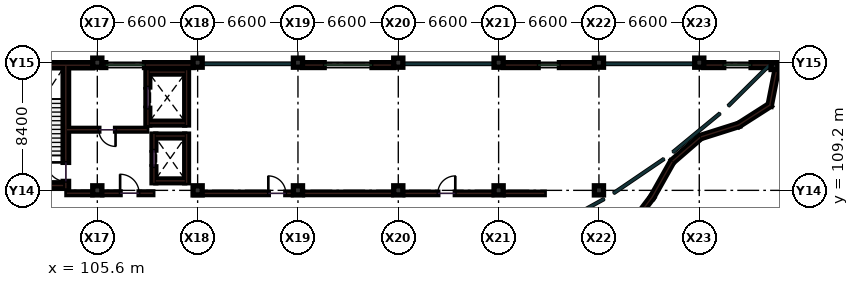
"""IFC4 building model, lengths in metres.
Left out: names, types, materials, properties, quantities, classifications, styles, units other than length and angle.
Written with IfcOpenShell. Run it as: python <this file> out.ifc"""

import sys

from ifc_helpers import new_model, si_unit, direction, frame, frame_2d, origin, origin_2d, place, context, subcontext, project, spatial, rectangle, extrude, element, fill, save


model = new_model("IFC4")
c1 = context("Model", 3, precision=1e-05, world=origin(), true_north=direction((0.0, 1.0)))
c2 = subcontext(c1, "Body", "Model", "MODEL_VIEW")
j1 = project(units=[si_unit("LENGTHUNIT", "METRE"), si_unit("PLANEANGLEUNIT", "RADIAN")], contexts=[c1])
p1 = place(None, origin())
s1 = spatial("IfcSite", under=j1, at=p1, CompositionType="ELEMENT")
p2 = place(p1, origin())
s2 = spatial("IfcBuilding", under=s1, at=p2, CompositionType="ELEMENT")
p3 = place(p2, frame((0.0, 0.0, 9.9)))
s3 = spatial("IfcBuildingStorey", under=s2, at=p3, CompositionType="ELEMENT", Elevation=9.9)
for number, where, z_axis, x_axis in (
    (1, (105.6, 109.2, 0.0), (0.0, 0.0, 1.0), (1.0, 0.0, 0.0)),
    (2, (105.6, 117.6, 0.0), (0.0, 0.0, 1.0), (1.0, 0.0, 0.0)),
    (3, (112.2, 109.2, 0.0), (0.0, 0.0, 1.0), (1.0, 0.0, 0.0)),
    (4, (112.2, 117.6, 0.0), (0.0, 0.0, 1.0), (1.0, 0.0, 0.0)),
    (5, (118.8, 109.2, 0.0), (0.0, 0.0, 1.0), (1.0, 0.0, 0.0)),
    (6, (118.8, 117.6, 0.0), (0.0, 0.0, 1.0), (1.0, 0.0, 0.0)),
    (7, (125.4, 109.2, 0.0), (0.0, 0.0, 1.0), (1.0, 0.0, 0.0)),
    (8, (125.4, 117.6, 0.0), (0.0, 0.0, 1.0), (1.0, 0.0, 0.0)),
    (9, (132.0, 109.2, 0.0), (0.0, 0.0, 1.0), (1.0, 0.0, 0.0)),
    (10, (132.0, 117.6, 0.0), (0.0, 0.0, 1.0), (1.0, 0.0, 0.0)),
    (11, (138.6, 109.2, 0.0), (0.0, 0.0, 1.0), (1.0, 0.0, 0.0)),
    (12, (138.6, 117.6, 0.0), (0.0, 0.0, 1.0), (1.0, 0.0, 0.0)),
    (13, (145.2, 117.6, 0.0), (0.0, 0.0, 1.0), (1.0, 0.0, 0.0)),
):
    element("IfcColumn", number, at=place(p3, frame(where, z_axis=z_axis, x_axis=x_axis)), inside=s3, PredefinedType="COLUMN", context=c2, shape_type="SweptSolid", body=[
        extrude(rectangle(XDim=0.6, YDim=0.6, at=origin_2d()), origin(), (0.0, 0.0, 1.0), 4.5),
    ])
p4 = place(p3, frame((150.15, 117.375, 0.0), z_axis=(0.0, 0.0, 1.0), x_axis=(1.0, 0.0, 0.0)))
e14 = element("IfcColumn", 14, at=p4, inside=s3, PredefinedType="COLUMN", context=c2, shape_type="SweptSolid", body=[
    extrude(rectangle(XDim=0.45, YDim=0.45, at=origin_2d()), origin(), (0.0, 0.0, 1.0), 4.5),
])
p5 = place(p3, frame((112.0, 109.0, 0.0), z_axis=(0.0, 0.0, 1.0), x_axis=(1.0, 0.0, 0.0)))
e15 = element("IfcWall", 15, at=p5, inside=s3, PredefinedType="PARTITIONING", context=c2, shape_type="SweptSolid", body=[
    extrude(rectangle(XDim=6.35, YDim=0.16, at=frame_2d((3.175, 0.0))), origin(), (0.0, 0.0, 1.0), 3.475),
])
p6 = place(p5, frame((4.85, 0.0, 0.0)))
e16 = element("IfcOpeningElement", 16, at=p6, cuts=e15, PredefinedType="OPENING", context=c2, shape_type="SweptSolid", body=[
    extrude(rectangle(XDim=1.15, YDim=2.2, at=frame_2d((0.575, 1.1))), frame((0.0, 0.09, 0.0), z_axis=(0.0, -1.0, 0.0), x_axis=(1.0, 0.0, 0.0)), (0.0, 0.0, 1.0), 0.18),
])
p7 = place(p3, frame((119.25, 109.0, 0.0), z_axis=(0.0, 0.0, 1.0), x_axis=(1.0, 0.0, 0.0)))
e17 = element("IfcWall", 17, at=p7, inside=s3, PredefinedType="PARTITIONING", context=c2, shape_type="SweptSolid", body=[
    extrude(rectangle(XDim=5.7, YDim=0.16, at=frame_2d((2.85, 0.0))), origin(), (0.0, 0.0, 1.0), 3.475),
])
p8 = place(p3, frame((125.85, 109.0, 0.0), z_axis=(0.0, 0.0, 1.0), x_axis=(1.0, 0.0, 0.0)))
e18 = element("IfcWall", 18, at=p8, inside=s3, PredefinedType="PARTITIONING", context=c2, shape_type="SweptSolid", body=[
    extrude(rectangle(XDim=5.7, YDim=0.16, at=frame_2d((2.85, 0.0))), origin(), (0.0, 0.0, 1.0), 3.475),
])
p9 = place(p8, frame((2.15, 0.0, 0.0)))
e19 = element("IfcOpeningElement", 19, at=p9, cuts=e18, PredefinedType="OPENING", context=c2, shape_type="SweptSolid", body=[
    extrude(rectangle(XDim=1.15, YDim=2.2, at=frame_2d((0.575, 1.1))), frame((0.0, 0.09, 0.0), z_axis=(0.0, -1.0, 0.0), x_axis=(1.0, 0.0, 0.0)), (0.0, 0.0, 1.0), 0.18),
])
p10 = place(p3, frame((132.45, 109.0, 0.0), z_axis=(0.0, 0.0, 1.0), x_axis=(1.0, 0.0, 0.0)))
e20 = element("IfcWall", 20, at=p10, inside=s3, PredefinedType="PARTITIONING", context=c2, shape_type="SweptSolid", body=[
    extrude(rectangle(XDim=2.55, YDim=0.16, at=frame_2d((1.275, 0.0))), origin(), (0.0, 0.0, 1.0), 3.475),
])
p11 = place(p3, frame((105.305, 117.43, 0.0), z_axis=(0.0, 0.0, 1.0), x_axis=(-1.0, 0.0, 0.0)))
e21 = element("IfcWall", 21, at=p11, inside=s3, PredefinedType="SHEAR", context=c2, shape_type="SweptSolid", body=[
    extrude(rectangle(XDim=6.01, YDim=0.34, at=frame_2d((3.005, 0.0))), origin(), (0.0, 0.0, 1.0), 4.24),
])
p12 = place(p3, frame((111.905, 117.44, 0.0), z_axis=(0.0, 0.0, 1.0), x_axis=(-1.0, 0.0, 0.0)))
e22 = element("IfcWall", 22, at=p12, inside=s3, PredefinedType="SOLIDWALL", context=c2, shape_type="SweptSolid", body=[
    extrude(rectangle(XDim=6.01, YDim=0.32, at=frame_2d((3.005, 0.0))), origin(), (0.0, 0.0, 1.0), 3.625),
])
p13 = place(p12, frame((3.2, 0.0, 0.95)))
e23 = element("IfcOpeningElement", 23, at=p13, cuts=e22, PredefinedType="OPENING", context=c2, shape_type="SweptSolid", body=[
    extrude(rectangle(XDim=2.55, YDim=1.65, at=frame_2d((1.275, 0.825))), frame((0.0, 0.17, 0.0), z_axis=(0.0, -1.0, 0.0), x_axis=(1.0, 0.0, 0.0)), (0.0, 0.0, 1.0), 0.34),
])
p14 = place(p3, frame((125.105, 117.44, 0.0), z_axis=(0.0, 0.0, 1.0), x_axis=(-1.0, 0.0, 0.0)))
e24 = element("IfcWall", 24, at=p14, inside=s3, PredefinedType="SOLIDWALL", context=c2, shape_type="SweptSolid", body=[
    extrude(rectangle(XDim=6.01, YDim=0.32, at=frame_2d((3.005, 0.0))), origin(), (0.0, 0.0, 1.0), 3.625),
])
p15 = place(p14, frame((1.43, 0.0, 0.95)))
e25 = element("IfcOpeningElement", 25, at=p15, cuts=e24, PredefinedType="OPENING", context=c2, shape_type="SweptSolid", body=[
    extrude(rectangle(XDim=3.15, YDim=1.7, at=frame_2d((1.575, 0.85))), frame((0.0, 0.17, 0.0), z_axis=(0.0, -1.0, 0.0), x_axis=(1.0, 0.0, 0.0)), (0.0, 0.0, 1.0), 0.34),
])
p16 = place(p3, frame((138.305, 117.44, 0.0), z_axis=(0.0, 0.0, 1.0), x_axis=(-1.0, 0.0, 0.0)))
e26 = element("IfcWall", 26, at=p16, inside=s3, PredefinedType="SOLIDWALL", context=c2, shape_type="SweptSolid", body=[
    extrude(rectangle(XDim=6.01, YDim=0.32, at=frame_2d((3.005, 0.0))), origin(), (0.0, 0.0, 1.0), 3.625),
])
p17 = place(p16, frame((2.305, 0.0, 0.95)))
e27 = element("IfcOpeningElement", 27, at=p17, cuts=e26, PredefinedType="OPENING", context=c2, shape_type="SweptSolid", body=[
    extrude(rectangle(XDim=1.4, YDim=1.95, at=frame_2d((0.7, 0.975))), frame((0.0, 0.17, 0.0), z_axis=(0.0, -1.0, 0.0), x_axis=(1.0, 0.0, 0.0)), (0.0, 0.0, 1.0), 0.34),
])
p18 = place(p3, frame((140.52, 106.67, 0.0), z_axis=(0.0, 0.0, 1.0), x_axis=(0.604579472853, 0.796544826739, 0.0)))
e28 = element("IfcWall", 28, at=p18, inside=s3, PredefinedType="SOLIDWALL", context=c2, shape_type="SweptSolid", body=[
    extrude(rectangle(XDim=2.63, YDim=0.22, at=frame_2d((1.315, 0.0))), origin(), (0.0, 0.0, 1.0), 1.45),
])
p19 = place(p3, frame((142.1, 108.75, 0.0), z_axis=(0.0, 0.0, 1.0), x_axis=(0.491473824436, 0.870892346903, 0.0)))
e29 = element("IfcWall", 29, at=p19, inside=s3, PredefinedType="SOLIDWALL", context=c2, shape_type="SweptSolid", body=[
    extrude(rectangle(XDim=2.676, YDim=0.22, at=frame_2d((1.338, 0.0))), origin(), (0.0, 0.0, 1.0), 1.45),
])
p20 = place(p3, frame((143.445, 111.115, 0.0), z_axis=(0.0, 0.0, 1.0), x_axis=(0.756282902718, 0.654244733304, 0.0)))
e30 = element("IfcWall", 30, at=p20, inside=s3, PredefinedType="SOLIDWALL", context=c2, shape_type="SweptSolid", body=[
    extrude(rectangle(XDim=2.4, YDim=0.22, at=frame_2d((1.2, 0.0))), origin(), (0.0, 0.0, 1.0), 1.45),
])
p21 = place(p3, frame((145.31, 112.715, 0.0), z_axis=(0.0, 0.0, 1.0), x_axis=(0.953332884241, 0.301921201351, 0.0)))
e31 = element("IfcWall", 31, at=p21, inside=s3, PredefinedType="SOLIDWALL", context=c2, shape_type="SweptSolid", body=[
    extrude(rectangle(XDim=2.633, YDim=0.22, at=frame_2d((1.316, 0.0))), origin(), (0.0, 0.0, 1.0), 1.45),
])
p22 = place(p3, frame((147.785, 113.495, 0.0), z_axis=(0.0, 0.0, 1.0), x_axis=(0.842674087903, 0.538423979385, 0.0)))
e32 = element("IfcWall", 32, at=p22, inside=s3, PredefinedType="SOLIDWALL", context=c2, shape_type="SweptSolid", body=[
    extrude(rectangle(XDim=2.498, YDim=0.22, at=frame_2d((1.249, 0.0))), origin(), (0.0, 0.0, 1.0), 1.45),
])
p23 = place(p3, frame((149.825, 114.745, 0.0), z_axis=(0.0, 0.0, 1.0), x_axis=(0.192134851616, 0.981368533628, 0.0)))
e33 = element("IfcWall", 33, at=p23, inside=s3, PredefinedType="SOLIDWALL", context=c2, shape_type="SweptSolid", body=[
    extrude(rectangle(XDim=2.655, YDim=0.22, at=frame_2d((1.327, 0.0))), origin(), (0.0, 0.0, 1.0), 1.45),
])
p24 = place(p3, frame((149.93, 117.44, 0.0), z_axis=(0.0, 0.0, 1.0), x_axis=(-1.0, 0.0, 0.0)))
e34 = element("IfcWall", 34, at=p24, inside=s3, PredefinedType="SOLIDWALL", context=c2, shape_type="SweptSolid", body=[
    extrude(rectangle(XDim=4.435, YDim=0.32, at=frame_2d((2.217, 0.0))), origin(), (0.0, 0.0, 1.0), 3.625),
])
p25 = place(p24, frame((1.32, 0.0, 0.95)))
e35 = element("IfcOpeningElement", 35, at=p25, cuts=e34, PredefinedType="OPENING", context=c2, shape_type="SweptSolid", body=[
    extrude(rectangle(XDim=1.8, YDim=1.6, at=frame_2d((0.9, 0.8))), frame((0.0, 0.17, 0.0), z_axis=(0.0, -1.0, 0.0), x_axis=(1.0, 0.0, 0.0)), (0.0, 0.0, 1.0), 0.34),
])
p26 = place(p3, frame((103.53, 109.34, 0.0), z_axis=(0.0, 0.0, 1.0), x_axis=(0.0, 1.0, 0.0)))
e36 = element("IfcWall", 36, at=p26, inside=s3, PredefinedType="SHEAR", context=c2, shape_type="SweptSolid", body=[
    extrude(rectangle(XDim=8.09, YDim=0.36, at=frame_2d((4.045, 0.0))), origin(), (0.0, 0.0, 1.0), 4.24),
])
p27 = place(p26, frame((0.45, 0.0, 0.0)))
e37 = element("IfcOpeningElement", 37, at=p27, cuts=e36, PredefinedType="OPENING", context=c2, shape_type="SweptSolid", body=[
    extrude(rectangle(XDim=1.25, YDim=2.15, at=frame_2d((0.625, 1.075))), frame((0.0, 0.19, 0.0), z_axis=(0.0, -1.0, 0.0), x_axis=(1.0, 0.0, 0.0)), (0.0, 0.0, 1.0), 0.38),
])
p28 = place(p3, frame((99.55, 109.52, 0.0), z_axis=(0.0, 0.0, 1.0), x_axis=(1.0, 0.0, 0.0)))
e38 = element("IfcWall", 38, at=p28, inside=s3, PredefinedType="SHEAR", context=c2, shape_type="SweptSolid", body=[
    extrude(rectangle(XDim=3.8, YDim=0.36, at=frame_2d((1.9, 0.0))), origin(), (0.0, 0.0, 1.0), 4.24),
])
p29 = place(p3, frame((109.325, 109.7, 0.0), z_axis=(0.0, 0.0, 1.0), x_axis=(0.0, 1.0, 0.0)))
e39 = element("IfcWall", 39, at=p29, inside=s3, PredefinedType="SHEAR", context=c2, shape_type="SweptSolid", body=[
    extrude(rectangle(XDim=3.2, YDim=0.25, at=frame_2d((1.6, 0.0))), origin(), (0.0, 0.0, 1.0), 4.24),
])
p30 = place(p29, frame((1.05, 0.0, 0.0)))
e40 = element("IfcOpeningElement", 40, at=p30, cuts=e39, PredefinedType="OPENING", context=c2, shape_type="SweptSolid", body=[
    extrude(rectangle(XDim=1.1, YDim=2.15, at=frame_2d((0.55, 1.075))), frame((0.0, 0.135, 0.0), z_axis=(0.0, -1.0, 0.0), x_axis=(1.0, 0.0, 0.0)), (0.0, 0.0, 1.0), 0.27),
])
p31 = place(p3, frame((111.475, 109.7, 0.0), z_axis=(0.0, 0.0, 1.0), x_axis=(0.0, 1.0, 0.0)))
e41 = element("IfcWall", 41, at=p31, inside=s3, PredefinedType="SHEAR", context=c2, shape_type="SweptSolid", body=[
    extrude(rectangle(XDim=3.2, YDim=0.25, at=frame_2d((1.6, 0.0))), origin(), (0.0, 0.0, 1.0), 4.24),
])
for number, where, z_axis, x_axis in (
    (42, (109.45, 109.825, 0.0), (0.0, 0.0, 1.0), (1.0, 0.0, 0.0)),
    (43, (109.45, 112.775, 0.0), (0.0, 0.0, 1.0), (1.0, 0.0, 0.0)),
):
    element("IfcWall", number, at=place(p3, frame(where, z_axis=z_axis, x_axis=x_axis)), inside=s3, PredefinedType="SHEAR", context=c2, shape_type="SweptSolid", body=[
        extrude(rectangle(XDim=1.9, YDim=0.25, at=frame_2d((0.95, 0.0))), origin(), (0.0, 0.0, 1.0), 4.24),
    ])
p32 = place(p3, frame((108.925, 113.5, 0.0), z_axis=(0.0, 0.0, 1.0), x_axis=(0.0, 1.0, 0.0)))
e44 = element("IfcWall", 44, at=p32, inside=s3, PredefinedType="SHEAR", context=c2, shape_type="SweptSolid", body=[
    extrude(rectangle(XDim=3.6, YDim=0.25, at=frame_2d((1.8, 0.0))), origin(), (0.0, 0.0, 1.0), 4.24),
])
p33 = place(p32, frame((1.1, 0.0, 0.0)))
e45 = element("IfcOpeningElement", 45, at=p33, cuts=e44, PredefinedType="OPENING", context=c2, shape_type="SweptSolid", body=[
    extrude(rectangle(XDim=1.4, YDim=2.2, at=frame_2d((0.7, 1.1))), frame((0.0, 0.135, 0.0), z_axis=(0.0, -1.0, 0.0), x_axis=(1.0, 0.0, 0.0)), (0.0, 0.0, 1.0), 0.27),
])
p34 = place(p3, frame((111.475, 113.5, 0.0), z_axis=(0.0, 0.0, 1.0), x_axis=(0.0, 1.0, 0.0)))
e46 = element("IfcWall", 46, at=p34, inside=s3, PredefinedType="SHEAR", context=c2, shape_type="SweptSolid", body=[
    extrude(rectangle(XDim=3.6, YDim=0.25, at=frame_2d((1.8, 0.0))), origin(), (0.0, 0.0, 1.0), 4.24),
])
for number, where, z_axis, x_axis in (
    (47, (109.05, 113.625, 0.0), (0.0, 0.0, 1.0), (1.0, 0.0, 0.0)),
    (48, (109.05, 116.975, 0.0), (0.0, 0.0, 1.0), (1.0, 0.0, 0.0)),
):
    element("IfcWall", number, at=place(p3, frame(where, z_axis=z_axis, x_axis=x_axis)), inside=s3, PredefinedType="SHEAR", context=c2, shape_type="SweptSolid", body=[
        extrude(rectangle(XDim=2.3, YDim=0.25, at=frame_2d((1.15, 0.0))), origin(), (0.0, 0.0, 1.0), 4.24),
    ])
p35 = place(p3, frame((103.6, 109.01, 0.0), z_axis=(0.0, 0.0, 1.0), x_axis=(1.0, 0.0, 0.0)))
e49 = element("IfcWall", 49, at=p35, inside=s3, PredefinedType="SOLIDWALL", context=c2, shape_type="SweptSolid", body=[
    extrude(rectangle(XDim=1.65, YDim=0.18, at=frame_2d((0.825, 0.0))), origin(), (0.0, 0.0, 1.0), 3.475),
])
p36 = place(p3, frame((105.95, 109.01, 0.0), z_axis=(0.0, 0.0, 1.0), x_axis=(1.0, 0.0, 0.0)))
e50 = element("IfcWall", 50, at=p36, inside=s3, PredefinedType="SOLIDWALL", context=c2, shape_type="SweptSolid", body=[
    extrude(rectangle(XDim=3.3, YDim=0.18, at=frame_2d((1.65, 0.0))), origin(), (0.0, 0.0, 1.0), 3.475),
])
p37 = place(p36, frame((1.15, 0.0, 0.0)))
e51 = element("IfcOpeningElement", 51, at=p37, cuts=e50, PredefinedType="OPENING", context=c2, shape_type="SweptSolid", body=[
    extrude(rectangle(XDim=1.25, YDim=2.15, at=frame_2d((0.625, 1.075))), frame((0.0, 0.1, 0.0), z_axis=(0.0, -1.0, 0.0), x_axis=(1.0, 0.0, 0.0)), (0.0, 0.0, 1.0), 0.2),
])
p38 = place(p3, frame((103.6, 113.19, 0.0), z_axis=(0.0, 0.0, 1.0), x_axis=(1.0, 0.0, 0.0)))
e52 = element("IfcWall", 52, at=p38, inside=s3, PredefinedType="SOLIDWALL", context=c2, shape_type="SweptSolid", body=[
    extrude(rectangle(XDim=5.25, YDim=0.18, at=frame_2d((2.625, 0.0))), origin(), (0.0, 0.0, 1.0), 4.24),
])
p39 = place(p38, frame((2.1, 0.0, 0.0)))
e53 = element("IfcOpeningElement", 53, at=p39, cuts=e52, PredefinedType="OPENING", context=c2, shape_type="SweptSolid", body=[
    extrude(rectangle(XDim=1.1, YDim=2.15, at=frame_2d((0.55, 1.075))), frame((0.0, 0.1, 0.0), z_axis=(0.0, -1.0, 0.0), x_axis=(1.0, 0.0, 0.0)), (0.0, 0.0, 1.0), 0.2),
])
p40 = place(p6, origin())
e54 = element("IfcDoor", 54, at=p40, inside=s3, OperationType="SINGLE_SWING_LEFT", PredefinedType="DOOR", context=c2, shape_type="SweptSolid", body=[
    extrude(rectangle(XDim=1.15, YDim=2.2, at=frame_2d((0.575, 1.1))), frame((0.0, 0.025, 0.0), z_axis=(0.0, -1.0, 0.0), x_axis=(1.0, 0.0, 0.0)), (0.0, 0.0, 1.0), 0.05),
])
fill(e16, e54)
p41 = place(p9, origin())
e55 = element("IfcDoor", 55, at=p41, inside=s3, OperationType="SINGLE_SWING_RIGHT", PredefinedType="DOOR", context=c2, shape_type="SweptSolid", body=[
    extrude(rectangle(XDim=1.15, YDim=2.2, at=frame_2d((0.575, 1.1))), frame((0.0, 0.025, 0.0), z_axis=(0.0, -1.0, 0.0), x_axis=(1.0, 0.0, 0.0)), (0.0, 0.0, 1.0), 0.05),
])
fill(e19, e55)
p42 = place(p13, origin())
e56 = element("IfcWindow", 56, at=p42, inside=s3, PartitioningType="SINGLE_PANEL", PredefinedType="WINDOW", context=c2, shape_type="SweptSolid", body=[
    extrude(rectangle(XDim=2.55, YDim=1.65, at=frame_2d((1.275, 0.825))), frame((0.0, 0.03, 0.0), z_axis=(0.0, -1.0, 0.0), x_axis=(1.0, 0.0, 0.0)), (0.0, 0.0, 1.0), 0.06),
])
fill(e23, e56)
p43 = place(p15, origin())
e57 = element("IfcWindow", 57, at=p43, inside=s3, PartitioningType="SINGLE_PANEL", PredefinedType="WINDOW", context=c2, shape_type="SweptSolid", body=[
    extrude(rectangle(XDim=3.15, YDim=1.7, at=frame_2d((1.575, 0.85))), frame((0.0, 0.03, 0.0), z_axis=(0.0, -1.0, 0.0), x_axis=(1.0, 0.0, 0.0)), (0.0, 0.0, 1.0), 0.06),
])
fill(e25, e57)
p44 = place(p17, origin())
e58 = element("IfcWindow", 58, at=p44, inside=s3, PartitioningType="SINGLE_PANEL", PredefinedType="WINDOW", context=c2, shape_type="SweptSolid", body=[
    extrude(rectangle(XDim=1.4, YDim=1.95, at=frame_2d((0.7, 0.975))), frame((0.0, 0.03, 0.0), z_axis=(0.0, -1.0, 0.0), x_axis=(1.0, 0.0, 0.0)), (0.0, 0.0, 1.0), 0.06),
])
fill(e27, e58)
p45 = place(p25, origin())
e59 = element("IfcWindow", 59, at=p45, inside=s3, PartitioningType="SINGLE_PANEL", PredefinedType="WINDOW", context=c2, shape_type="SweptSolid", body=[
    extrude(rectangle(XDim=1.8, YDim=1.6, at=frame_2d((0.9, 0.8))), frame((0.0, 0.03, 0.0), z_axis=(0.0, -1.0, 0.0), x_axis=(1.0, 0.0, 0.0)), (0.0, 0.0, 1.0), 0.06),
])
fill(e35, e59)
p46 = place(p27, origin())
e60 = element("IfcDoor", 60, at=p46, inside=s3, OperationType="SINGLE_SWING_RIGHT", PredefinedType="DOOR", context=c2, shape_type="SweptSolid", body=[
    extrude(rectangle(XDim=1.25, YDim=2.15, at=frame_2d((0.625, 1.075))), frame((0.0, 0.025, 0.0), z_axis=(0.0, -1.0, 0.0), x_axis=(1.0, 0.0, 0.0)), (0.0, 0.0, 1.0), 0.05),
])
fill(e37, e60)
p47 = place(p30, origin())
e61 = element("IfcDoor", 61, at=p47, inside=s3, OperationType="SLIDING_TO_LEFT", PredefinedType="DOOR", context=c2, shape_type="SweptSolid", body=[
    extrude(rectangle(XDim=1.1, YDim=2.15, at=frame_2d((0.55, 1.075))), frame((0.0, 0.025, 0.0), z_axis=(0.0, -1.0, 0.0), x_axis=(1.0, 0.0, 0.0)), (0.0, 0.0, 1.0), 0.05),
])
fill(e40, e61)
p48 = place(p33, origin())
e62 = element("IfcDoor", 62, at=p48, inside=s3, OperationType="SLIDING_TO_LEFT", PredefinedType="DOOR", context=c2, shape_type="SweptSolid", body=[
    extrude(rectangle(XDim=1.4, YDim=2.2, at=frame_2d((0.7, 1.1))), frame((0.0, 0.025, 0.0), z_axis=(0.0, -1.0, 0.0), x_axis=(1.0, 0.0, 0.0)), (0.0, 0.0, 1.0), 0.05),
])
fill(e45, e62)
p49 = place(p37, origin())
e63 = element("IfcDoor", 63, at=p49, inside=s3, OperationType="SINGLE_SWING_LEFT", PredefinedType="DOOR", context=c2, shape_type="SweptSolid", body=[
    extrude(rectangle(XDim=1.25, YDim=2.15, at=frame_2d((0.625, 1.075))), frame((0.0, 0.025, 0.0), z_axis=(0.0, -1.0, 0.0), x_axis=(1.0, 0.0, 0.0)), (0.0, 0.0, 1.0), 0.05),
])
fill(e51, e63)
p50 = place(p39, frame((1.1, 0.0, 0.0), z_axis=(0.0, 0.0, 1.0), x_axis=(-1.0, 0.0, 0.0)))
e64 = element("IfcDoor", 64, at=p50, inside=s3, OperationType="SINGLE_SWING_RIGHT", PredefinedType="DOOR", context=c2, shape_type="SweptSolid", body=[
    extrude(rectangle(XDim=1.1, YDim=2.15, at=frame_2d((0.55, 1.075))), frame((0.0, 0.025, 0.0), z_axis=(0.0, -1.0, 0.0), x_axis=(1.0, 0.0, 0.0)), (0.0, 0.0, 1.0), 0.05),
])
fill(e53, e64)
save(model, sys.argv[1])
